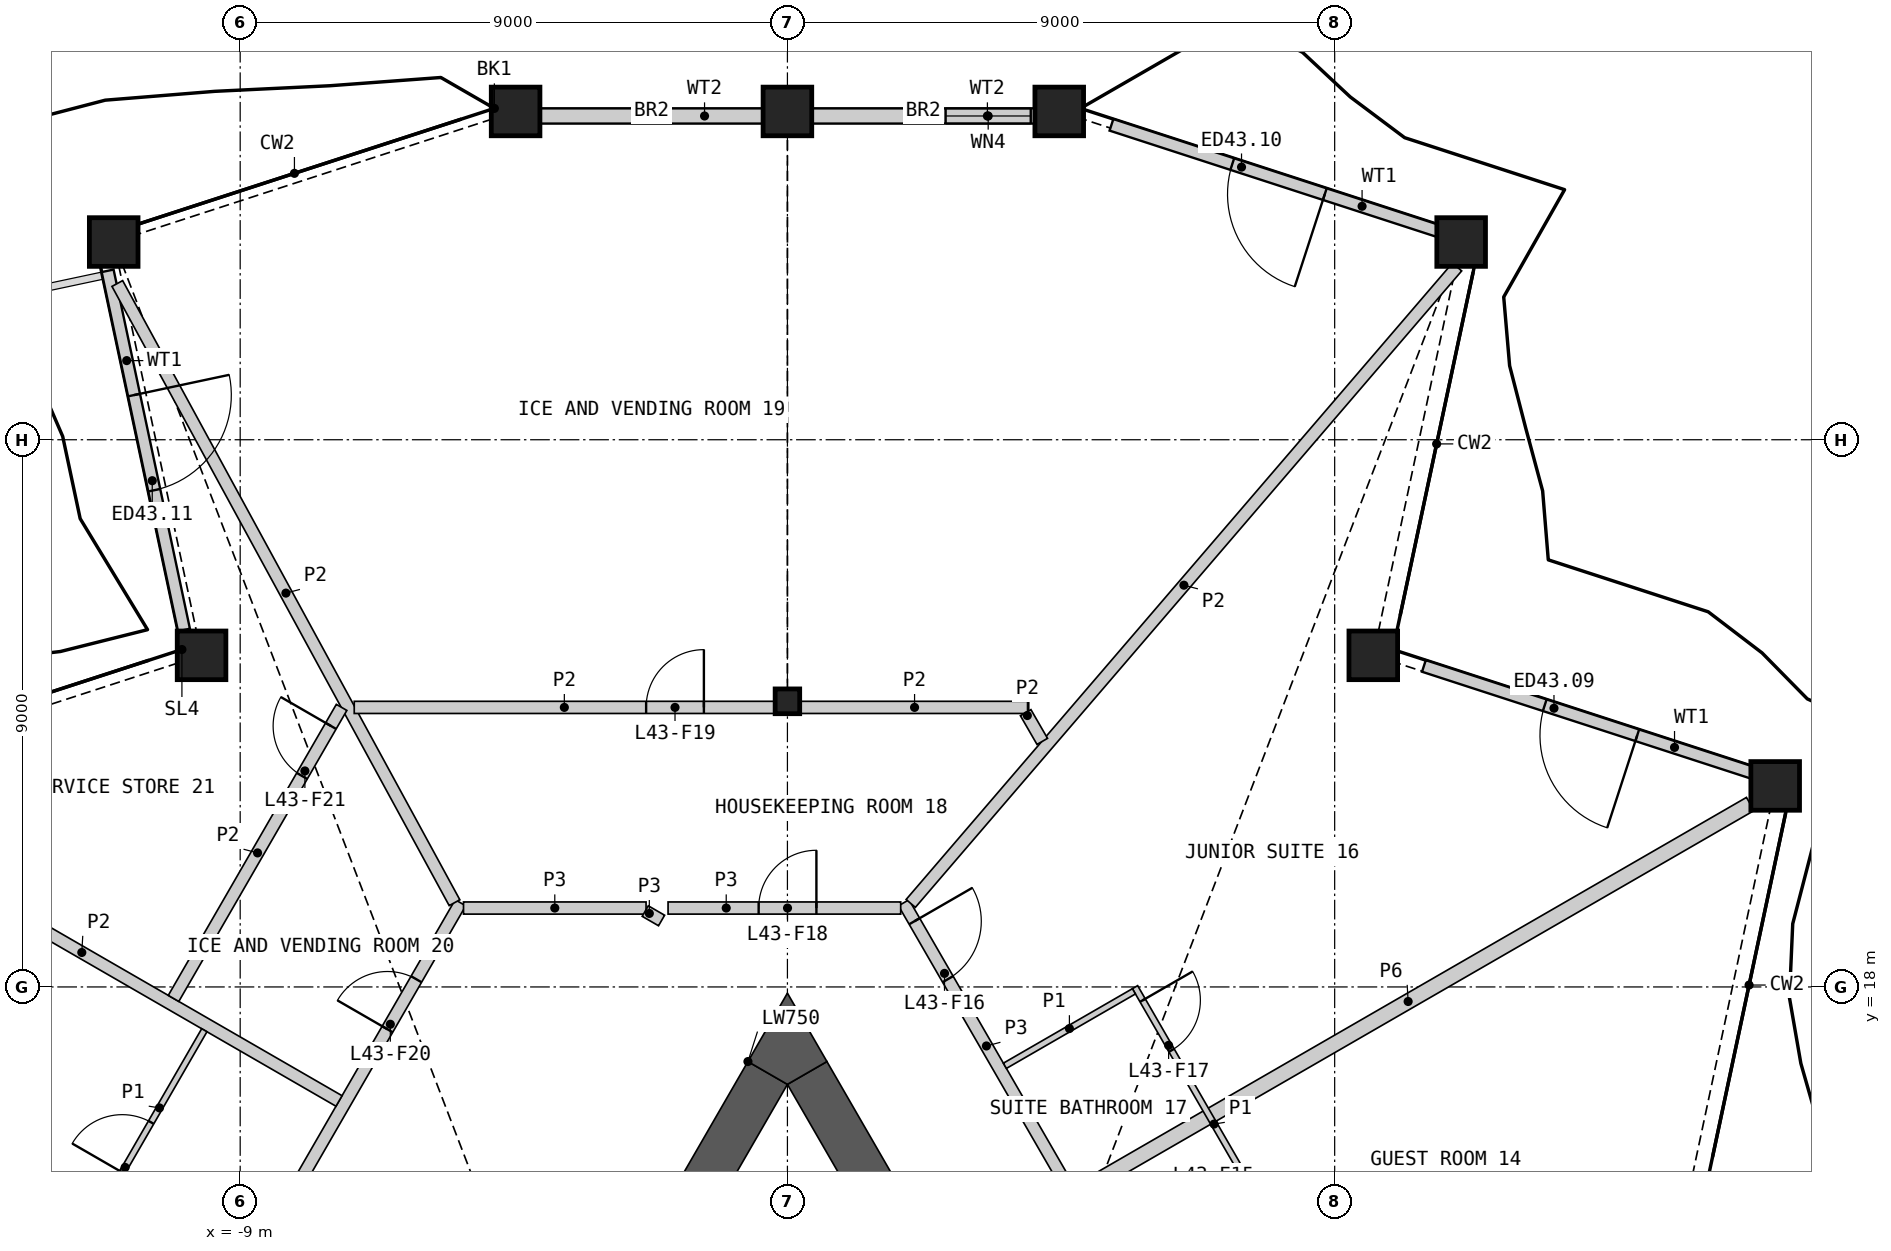
"""IFC4 building model, lengths in metres.
Left out: names, types, materials, properties, quantities, classifications, styles, units other than length and angle.
Written with IfcOpenShell. Run it as: python <this file> out.ifc"""

import sys

from ifc_helpers import new_model, si_unit, direction, frame, frame_2d, origin, origin_2d, place, context, subcontext, project, spatial, polyline, rectangle, hollow_rectangle, i_section, outline, extrude, element, fill, save


model = new_model("IFC4")
c1 = context("Model", 3, precision=1e-05, world=origin(), true_north=direction((0.0, 1.0)))
c2 = subcontext(c1, "Body", "Model", "MODEL_VIEW")
j1 = project(units=[si_unit("LENGTHUNIT", "METRE"), si_unit("PLANEANGLEUNIT", "RADIAN")], contexts=[c1])
p1 = place(None, origin())
s1 = spatial("IfcSite", under=j1, at=p1, CompositionType="ELEMENT")
p2 = place(p1, origin())
s2 = spatial("IfcBuilding", under=s1, at=p2, CompositionType="ELEMENT")
p3 = place(p2, frame((0.0, 0.0, 198.0)))
s3 = spatial("IfcBuildingStorey", under=s2, at=p3, CompositionType="ELEMENT", Elevation=198.0)
for number, where, z_axis, x_axis in (
    (1, (16.245, 21.306, 0.0), (0.0, 0.0, 1.0), (1.0, 0.0, 0.0)),
    (2, (9.635, 23.454, 0.0), (0.0, 0.0, 1.0), (1.0, 0.0, 0.0)),
    (3, (11.08, 30.252, 0.0), (0.0, 0.0, 1.0), (1.0, 0.0, 0.0)),
    (4, (4.47, 32.399, 0.0), (0.0, 0.0, 1.0), (1.0, 0.0, 0.0)),
    (5, (0.0, 32.399, 0.0), (0.0, 0.0, 1.0), (1.0, 0.0, 0.0)),
    (6, (-4.47, 32.399, 0.0), (0.0, 0.0, 1.0), (1.0, 0.0, 0.0)),
    (7, (-11.08, 30.252, 0.0), (0.0, 0.0, 1.0), (1.0, 0.0, 0.0)),
    (8, (-9.635, 23.454, 0.0), (0.0, 0.0, 1.0), (1.0, 0.0, 0.0)),
):
    element("IfcColumn", number, at=place(p3, frame(where, z_axis=z_axis, x_axis=x_axis)), inside=s3, PredefinedType="COLUMN", context=c2, shape_type="SweptSolid", body=[
        extrude(hollow_rectangle(XDim=0.8, YDim=0.8, WallThickness=0.05, at=origin_2d()), origin(), (0.0, 0.0, 1.0), 3.6),
    ])
p4 = place(p3, frame((0.0, 22.698, 0.0), z_axis=(0.0, 0.0, 1.0), x_axis=(1.0, 0.0, 0.0)))
e9 = element("IfcColumn", 9, at=p4, inside=s3, PredefinedType="COLUMN", context=c2, shape_type="SweptSolid", body=[
    extrude(i_section(OverallWidth=0.404, OverallDepth=0.407, WebThickness=0.027, FlangeThickness=0.044, at=origin_2d()), origin(), (0.0, 0.0, 1.0), 3.6),
])
p5 = place(p3, frame((15.963, 21.493, 0.0), z_axis=(0.0, 0.0, 1.0), x_axis=(-0.951059834965, 0.309006780371, 0.0)))
e10 = element("IfcWall", 10, at=p5, inside=s3, PredefinedType="SOLIDWALL", context=c2, shape_type="SweptSolid", body=[
    extrude(rectangle(XDim=5.779, YDim=0.2, at=frame_2d((2.889, 0.0))), origin(), (0.0, 0.0, 1.0), 2.701),
])
p6 = place(p5, frame((2.089, 0.0, 0.0)))
e11 = element("IfcOpeningElement", 11, at=p6, cuts=e10, PredefinedType="OPENING", context=c2, shape_type="SweptSolid", body=[
    extrude(rectangle(XDim=1.6, YDim=2.4, at=frame_2d((0.8, 1.2))), frame((0.0, 0.11, 0.0), z_axis=(0.0, -1.0, 0.0), x_axis=(1.0, 0.0, 0.0)), (0.0, 0.0, 1.0), 0.22),
])
p7 = place(p3, frame((10.825, 30.394, 0.0), z_axis=(0.0, 0.0, 1.0), x_axis=(-0.9510558006, 0.30901919705, 0.0)))
e12 = element("IfcWall", 12, at=p7, inside=s3, PredefinedType="SOLIDWALL", context=c2, shape_type="SweptSolid", body=[
    extrude(rectangle(XDim=5.778, YDim=0.2, at=frame_2d((2.889, 0.0))), origin(), (0.0, 0.0, 1.0), 2.701),
])
p8 = place(p7, frame((2.089, 0.0, 0.0)))
e13 = element("IfcOpeningElement", 13, at=p8, cuts=e12, PredefinedType="OPENING", context=c2, shape_type="SweptSolid", body=[
    extrude(rectangle(XDim=1.6, YDim=2.4, at=frame_2d((0.8, 1.2))), frame((0.0, 0.11, 0.0), z_axis=(0.0, -1.0, 0.0), x_axis=(1.0, 0.0, 0.0)), (0.0, 0.0, 1.0), 0.22),
])
p9 = place(p3, frame((4.252, 32.325, 0.0), z_axis=(0.0, 0.0, 1.0), x_axis=(-1.0, 0.0, 0.0)))
e14 = element("IfcWall", 14, at=p9, inside=s3, PredefinedType="SOLIDWALL", context=c2, shape_type="SweptSolid", body=[
    extrude(rectangle(XDim=3.852, YDim=0.25, at=frame_2d((1.926, 0.0))), origin(), (0.0, 0.0, 1.0), 2.701),
])
p10 = place(p9, frame((0.25, 0.0, 0.4)))
e15 = element("IfcOpeningElement", 15, at=p10, cuts=e14, PredefinedType="OPENING", context=c2, shape_type="SweptSolid", body=[
    extrude(rectangle(XDim=1.4, YDim=0.7, at=frame_2d((0.7, 0.35))), frame((0.0, 0.135, 0.0), z_axis=(0.0, -1.0, 0.0), x_axis=(1.0, 0.0, 0.0)), (0.0, 0.0, 1.0), 0.27),
])
p11 = place(p3, frame((-0.4, 32.325, 0.0), z_axis=(0.0, 0.0, 1.0), x_axis=(-1.0, 0.0, 0.0)))
e16 = element("IfcWall", 16, at=p11, inside=s3, PredefinedType="SOLIDWALL", context=c2, shape_type="SweptSolid", body=[
    extrude(rectangle(XDim=3.852, YDim=0.25, at=frame_2d((1.926, 0.0))), origin(), (0.0, 0.0, 1.0), 2.701),
])
p12 = place(p3, frame((-11.18, 29.778, 0.0), z_axis=(0.0, 0.0, 1.0), x_axis=(0.207894531291, -0.978151247946, 0.0)))
e17 = element("IfcWall", 17, at=p12, inside=s3, PredefinedType="SOLIDWALL", context=c2, shape_type="SweptSolid", body=[
    extrude(rectangle(XDim=6.04, YDim=0.2, at=frame_2d((3.02, 0.0))), origin(), (0.0, 0.0, 1.0), 2.701),
])
p13 = place(p12, frame((2.089, 0.0, 0.0)))
e18 = element("IfcOpeningElement", 18, at=p13, cuts=e17, PredefinedType="OPENING", context=c2, shape_type="SweptSolid", body=[
    extrude(rectangle(XDim=1.6, YDim=2.4, at=frame_2d((0.8, 1.2))), frame((0.0, 0.11, 0.0), z_axis=(0.0, -1.0, 0.0), x_axis=(1.0, 0.0, 0.0)), (0.0, 0.0, 1.0), 0.22),
])
p14 = place(p3, frame((6.875, 5.24, 0.0), z_axis=(0.0, 0.0, 1.0), x_axis=(-0.499997217876, 0.866027010039, 0.0)))
e19 = element("IfcWall", 19, at=p14, inside=s3, PredefinedType="SHEAR", context=c2, shape_type="SweptSolid", body=[
    extrude(rectangle(XDim=13.101, YDim=0.75, at=frame_2d((6.551, 0.0))), origin(), (0.0, 0.0, 1.0), 3.25),
])
p15 = place(p3, frame((-0.325, 16.585, 0.0), z_axis=(0.0, 0.0, 1.0), x_axis=(-0.500012199891, -0.86601836006, 0.0)))
e20 = element("IfcWall", 20, at=p15, inside=s3, PredefinedType="SHEAR", context=c2, shape_type="SweptSolid", body=[
    extrude(rectangle(XDim=7.051, YDim=0.75, at=frame_2d((3.525, 0.0))), origin(), (0.0, 0.0, 1.0), 3.25),
])
p16 = place(p3, origin())
e21 = element("IfcWall", 21, at=p16, inside=s3, PredefinedType="SHEAR", context=c2, shape_type="SweptSolid", body=[
    extrude(outline(polyline([(-0.649, 16.773), (0.0, 17.898), (0.649, 16.773), (0.0, 16.398), (-0.649, 16.773)])), origin(), (0.0, 0.0, 1.0), 3.25),
])
p17 = place(p3, frame((-19.476, -5.035, 0.0), z_axis=(0.0, 0.0, 1.0), x_axis=(0.500000757641, 0.86602496636, 0.0)))
e22 = element("IfcWall", 22, at=p17, inside=s3, PredefinedType="PARTITIONING", context=c2, shape_type="SweptSolid", body=[
    extrude(rectangle(XDim=28.198, YDim=0.2, at=frame_2d((14.099, 0.0))), origin(), (0.0, 0.0, 1.0), 3.25),
])
p18 = place(p17, frame((25.796, 0.0, 0.0)))
e23 = element("IfcOpeningElement", 23, at=p18, cuts=e22, PredefinedType="OPENING", context=c2, shape_type="SweptSolid", body=[
    extrude(rectangle(XDim=0.95, YDim=2.1, at=frame_2d((0.475, 1.05))), frame((0.0, 0.11, 0.0), z_axis=(0.0, -1.0, 0.0), x_axis=(1.0, 0.0, 0.0)), (0.0, 0.0, 1.0), 0.22),
])
p19 = place(p17, frame((14.603, 0.0, 0.0)))
e24 = element("IfcOpeningElement", 24, at=p19, cuts=e22, PredefinedType="OPENING", context=c2, shape_type="SweptSolid", body=[
    extrude(rectangle(XDim=1.1, YDim=2.1, at=frame_2d((0.55, 1.05))), frame((0.0, 0.11, 0.0), z_axis=(0.0, -1.0, 0.0), x_axis=(1.0, 0.0, 0.0)), (0.0, 0.0, 1.0), 0.22),
])
p20 = place(p17, frame((11.993, 0.0, 0.0)))
e25 = element("IfcOpeningElement", 25, at=p20, cuts=e22, PredefinedType="OPENING", context=c2, shape_type="SweptSolid", body=[
    extrude(rectangle(XDim=1.1, YDim=2.1, at=frame_2d((0.55, 1.05))), frame((0.0, 0.11, 0.0), z_axis=(0.0, -1.0, 0.0), x_axis=(1.0, 0.0, 0.0)), (0.0, 0.0, 1.0), 0.22),
])
p21 = place(p17, frame((1.452, 0.0, 0.0)))
e26 = element("IfcOpeningElement", 26, at=p21, cuts=e22, PredefinedType="OPENING", context=c2, shape_type="SweptSolid", body=[
    extrude(rectangle(XDim=0.95, YDim=2.1, at=frame_2d((0.475, 1.05))), frame((0.0, 0.11, 0.0), z_axis=(0.0, -1.0, 0.0), x_axis=(1.0, 0.0, 0.0)), (0.0, 0.0, 1.0), 0.22),
])
p22 = place(p3, frame((4.582, 14.512, 0.0), z_axis=(0.0, 0.0, 1.0), x_axis=(0.866027263711, 0.4999967785, 0.0)))
e27 = element("IfcWall", 27, at=p22, inside=s3, PredefinedType="PARTITIONING", context=c2, shape_type="SweptSolid", body=[
    extrude(rectangle(XDim=12.994, YDim=0.25, at=frame_2d((6.497, 0.0))), origin(), (0.0, 0.0, 1.0), 2.404),
])
p23 = place(p3, frame((1.913, 19.385, 0.0), z_axis=(0.0, 0.0, 1.0), x_axis=(0.499972435384, -0.866041317638, 0.0)))
e28 = element("IfcWall", 28, at=p23, inside=s3, PredefinedType="PARTITIONING", context=c2, shape_type="SweptSolid", body=[
    extrude(rectangle(XDim=5.439, YDim=0.2, at=frame_2d((2.719, 0.0))), origin(), (0.0, 0.0, 1.0), 3.25),
])
p24 = place(p23, frame((0.351, 0.0, 0.0)))
e29 = element("IfcOpeningElement", 29, at=p24, cuts=e28, PredefinedType="OPENING", context=c2, shape_type="SweptSolid", body=[
    extrude(rectangle(XDim=1.1, YDim=2.1, at=frame_2d((0.55, 1.05))), frame((0.0, 0.11, 0.0), z_axis=(0.0, -1.0, 0.0), x_axis=(1.0, 0.0, 0.0)), (0.0, 0.0, 1.0), 0.22),
])
p25 = place(p3, frame((-1.963, 19.298, 0.0), z_axis=(0.0, 0.0, 1.0), x_axis=(1.0, 0.0, 0.0)))
e30 = element("IfcWall", 30, at=p25, inside=s3, PredefinedType="PARTITIONING", context=c2, shape_type="SweptSolid", body=[
    extrude(rectangle(XDim=3.826, YDim=0.2, at=frame_2d((1.913, 0.0))), origin(), (0.0, 0.0, 1.0), 3.25),
])
p26 = place(p25, frame((1.49, 0.0, 0.0)))
e31 = element("IfcOpeningElement", 31, at=p26, cuts=e30, PredefinedType="OPENING", context=c2, shape_type="SweptSolid", body=[
    extrude(rectangle(XDim=0.95, YDim=2.1, at=frame_2d((0.475, 1.05))), frame((0.0, 0.11, 0.0), z_axis=(0.0, -1.0, 0.0), x_axis=(1.0, 0.0, 0.0)), (0.0, 0.0, 1.0), 0.22),
])
p27 = place(p3, frame((-5.327, 19.298, 0.0), z_axis=(0.0, 0.0, 1.0), x_axis=(1.0, 0.0, 0.0)))
e32 = element("IfcWall", 32, at=p27, inside=s3, PredefinedType="PARTITIONING", context=c2, shape_type="SweptSolid", body=[
    extrude(rectangle(XDim=3.002, YDim=0.2, at=frame_2d((1.501, 0.0))), origin(), (0.0, 0.0, 1.0), 3.25),
])
p28 = place(p3, frame((-2.338, 19.248, 0.0), z_axis=(0.0, 0.0, 1.0), x_axis=(0.866395311824, -0.499358752451, 0.0)))
e33 = element("IfcWall", 33, at=p28, inside=s3, PredefinedType="PARTITIONING", context=c2, shape_type="SweptSolid", body=[
    extrude(rectangle(XDim=0.31, YDim=0.2, at=frame_2d((0.155, 0.0))), origin(), (0.0, 0.0, 1.0), 3.25),
])
p29 = place(p3, frame((2.028, 19.374, 0.0), z_axis=(0.0, 0.0, 1.0), x_axis=(0.651304244859, 0.758816697647, 0.0)))
e34 = element("IfcWall", 34, at=p29, inside=s3, PredefinedType="PARTITIONING", context=c2, shape_type="SweptSolid", body=[
    extrude(rectangle(XDim=13.795, YDim=0.2, at=frame_2d((6.897, 0.0))), origin(), (0.0, 0.0, 1.0), 2.404),
])
p30 = place(p3, frame((-11.021, 29.57, 0.0), z_axis=(0.0, 0.0, 1.0), x_axis=(0.478233946204, -0.878232482147, 0.0)))
e35 = element("IfcWall", 35, at=p30, inside=s3, PredefinedType="PARTITIONING", context=c2, shape_type="SweptSolid", body=[
    extrude(rectangle(XDim=11.596, YDim=0.2, at=frame_2d((5.798, 0.0))), origin(), (0.0, 0.0, 1.0), 2.404),
])
p31 = place(p3, frame((-15.835, 21.009, 0.0), z_axis=(0.0, 0.0, 1.0), x_axis=(0.866024525919, -0.500001520505, 0.0)))
e36 = element("IfcWall", 36, at=p31, inside=s3, PredefinedType="PARTITIONING", context=c2, shape_type="SweptSolid", body=[
    extrude(rectangle(XDim=9.769, YDim=0.2, at=frame_2d((4.885, 0.0))), origin(), (0.0, 0.0, 1.0), 2.404),
])
p32 = place(p3, frame((-7.124, 22.598, 0.0), z_axis=(0.0, 0.0, 1.0), x_axis=(1.0, 0.0, 0.0)))
e37 = element("IfcWall", 37, at=p32, inside=s3, PredefinedType="PARTITIONING", context=c2, shape_type="SweptSolid", body=[
    extrude(rectangle(XDim=6.911, YDim=0.2, at=frame_2d((3.455, 0.0))), origin(), (0.0, 0.0, 1.0), 2.404),
])
p33 = place(p32, frame((4.801, 0.0, 0.0)))
e38 = element("IfcOpeningElement", 38, at=p33, cuts=e37, PredefinedType="OPENING", context=c2, shape_type="SweptSolid", body=[
    extrude(rectangle(XDim=0.95, YDim=2.1, at=frame_2d((0.475, 1.05))), frame((0.0, 0.11, 0.0), z_axis=(0.0, -1.0, 0.0), x_axis=(1.0, 0.0, 0.0)), (0.0, 0.0, 1.0), 0.22),
])
p34 = place(p3, frame((-10.096, 17.811, 0.0), z_axis=(0.0, 0.0, 1.0), x_axis=(0.500015590807, 0.866016402241, 0.0)))
e39 = element("IfcWall", 39, at=p34, inside=s3, PredefinedType="PARTITIONING", context=c2, shape_type="SweptSolid", body=[
    extrude(rectangle(XDim=5.527, YDim=0.2, at=frame_2d((2.764, 0.0))), origin(), (0.0, 0.0, 1.0), 2.404),
])
p35 = place(p34, frame((4.225, 0.0, 0.0)))
e40 = element("IfcOpeningElement", 40, at=p35, cuts=e39, PredefinedType="OPENING", context=c2, shape_type="SweptSolid", body=[
    extrude(rectangle(XDim=0.95, YDim=2.1, at=frame_2d((0.475, 1.05))), frame((0.0, 0.11, 0.0), z_axis=(0.0, -1.0, 0.0), x_axis=(1.0, 0.0, 0.0)), (0.0, 0.0, 1.0), 0.22),
])
p36 = place(p3, frame((0.214, 22.598, 0.0), z_axis=(0.0, 0.0, 1.0), x_axis=(1.0, 0.0, 0.0)))
e41 = element("IfcWall", 41, at=p36, inside=s3, PredefinedType="PARTITIONING", context=c2, shape_type="SweptSolid", body=[
    extrude(rectangle(XDim=3.755, YDim=0.2, at=frame_2d((1.877, 0.0))), origin(), (0.0, 0.0, 1.0), 2.404),
])
p37 = place(p3, frame((3.918, 22.511, 0.0), z_axis=(0.0, 0.0, 1.0), x_axis=(0.500083826171, -0.865977001312, 0.0)))
e42 = element("IfcWall", 42, at=p37, inside=s3, PredefinedType="PARTITIONING", context=c2, shape_type="SweptSolid", body=[
    extrude(rectangle(XDim=0.546, YDim=0.2, at=frame_2d((0.273, 0.0))), origin(), (0.0, 0.0, 1.0), 2.404),
])
p38 = place(p3, frame((5.717, 17.996, 0.0), z_axis=(0.0, 0.0, 1.0), x_axis=(0.500027264788, -0.866009661879, 0.0)))
e43 = element("IfcWall", 43, at=p38, inside=s3, PredefinedType="PARTITIONING", context=c2, shape_type="SweptSolid", body=[
    extrude(rectangle(XDim=5.2, YDim=0.1, at=frame_2d((2.6, 0.0))), origin(), (0.0, 0.0, 1.0), 2.404),
])
p39 = place(p38, frame((4.0, 0.0, 0.0)))
e44 = element("IfcOpeningElement", 44, at=p39, cuts=e43, PredefinedType="OPENING", context=c2, shape_type="SweptSolid", body=[
    extrude(rectangle(XDim=0.95, YDim=2.1, at=frame_2d((0.475, 1.05))), frame((0.0, 0.06, 0.0), z_axis=(0.0, -1.0, 0.0), x_axis=(1.0, 0.0, 0.0)), (0.0, 0.0, 1.0), 0.12),
])
p40 = place(p38, frame((0.25, 0.0, 0.0)))
e45 = element("IfcOpeningElement", 45, at=p40, cuts=e43, PredefinedType="OPENING", context=c2, shape_type="SweptSolid", body=[
    extrude(rectangle(XDim=0.95, YDim=2.1, at=frame_2d((0.475, 1.05))), frame((0.0, 0.06, 0.0), z_axis=(0.0, -1.0, 0.0), x_axis=(1.0, 0.0, 0.0)), (0.0, 0.0, 1.0), 0.12),
])
p41 = place(p3, frame((-11.065, 14.733, 0.0), z_axis=(0.0, 0.0, 1.0), x_axis=(0.500037662692, 0.866003658127, 0.0)))
e46 = element("IfcWall", 46, at=p41, inside=s3, PredefinedType="PARTITIONING", context=c2, shape_type="SweptSolid", body=[
    extrude(rectangle(XDim=2.95, YDim=0.1, at=frame_2d((1.475, 0.0))), origin(), (0.0, 0.0, 1.0), 2.404),
])
p42 = place(p41, frame((0.25, 0.0, 0.0)))
e47 = element("IfcOpeningElement", 47, at=p42, cuts=e46, PredefinedType="OPENING", context=c2, shape_type="SweptSolid", body=[
    extrude(rectangle(XDim=0.95, YDim=2.1, at=frame_2d((0.475, 1.05))), frame((0.0, 0.06, 0.0), z_axis=(0.0, -1.0, 0.0), x_axis=(1.0, 0.0, 0.0)), (0.0, 0.0, 1.0), 0.12),
])
p43 = place(p3, frame((3.576, 16.703, 0.0), z_axis=(0.0, 0.0, 1.0), x_axis=(0.866057815567, 0.499943856944, 0.0)))
e48 = element("IfcWall", 48, at=p43, inside=s3, PredefinedType="PARTITIONING", context=c2, shape_type="SweptSolid", body=[
    extrude(rectangle(XDim=2.45, YDim=0.1, at=frame_2d((1.225, 0.0))), origin(), (0.0, 0.0, 1.0), 2.404),
])
p44 = place(p6, origin())
e49 = element("IfcDoor", 49, at=p44, inside=s3, OperationType="DOUBLE_DOOR_SINGLE_SWING", PredefinedType="DOOR", context=c2, shape_type="SweptSolid", body=[
    extrude(rectangle(XDim=1.6, YDim=2.4, at=frame_2d((0.8, 1.2))), frame((0.0, 0.025, 0.0), z_axis=(0.0, -1.0, 0.0), x_axis=(1.0, 0.0, 0.0)), (0.0, 0.0, 1.0), 0.05),
])
fill(e11, e49)
p45 = place(p8, origin())
e50 = element("IfcDoor", 50, at=p45, inside=s3, OperationType="DOUBLE_DOOR_SINGLE_SWING", PredefinedType="DOOR", context=c2, shape_type="SweptSolid", body=[
    extrude(rectangle(XDim=1.6, YDim=2.4, at=frame_2d((0.8, 1.2))), frame((0.0, 0.025, 0.0), z_axis=(0.0, -1.0, 0.0), x_axis=(1.0, 0.0, 0.0)), (0.0, 0.0, 1.0), 0.05),
])
fill(e13, e50)
p46 = place(p10, origin())
e51 = element("IfcWindow", 51, at=p46, inside=s3, PartitioningType="SINGLE_PANEL", PredefinedType="WINDOW", context=c2, shape_type="SweptSolid", body=[
    extrude(rectangle(XDim=1.4, YDim=0.7, at=frame_2d((0.7, 0.35))), frame((0.0, 0.03, 0.0), z_axis=(0.0, -1.0, 0.0), x_axis=(1.0, 0.0, 0.0)), (0.0, 0.0, 1.0), 0.06),
])
fill(e15, e51)
p47 = place(p13, origin())
e52 = element("IfcDoor", 52, at=p47, inside=s3, OperationType="DOUBLE_DOOR_SINGLE_SWING", PredefinedType="DOOR", context=c2, shape_type="SweptSolid", body=[
    extrude(rectangle(XDim=1.6, YDim=2.4, at=frame_2d((0.8, 1.2))), frame((0.0, 0.025, 0.0), z_axis=(0.0, -1.0, 0.0), x_axis=(1.0, 0.0, 0.0)), (0.0, 0.0, 1.0), 0.05),
])
fill(e18, e52)
p48 = place(p24, origin())
e53 = element("IfcDoor", 53, at=p48, inside=s3, OperationType="SINGLE_SWING_LEFT", PredefinedType="DOOR", context=c2, shape_type="SweptSolid", body=[
    extrude(rectangle(XDim=1.1, YDim=2.1, at=frame_2d((0.55, 1.05))), frame((0.0, 0.025, 0.0), z_axis=(0.0, -1.0, 0.0), x_axis=(1.0, 0.0, 0.0)), (0.0, 0.0, 1.0), 0.05),
])
fill(e29, e53)
p49 = place(p40, origin())
e54 = element("IfcDoor", 54, at=p49, inside=s3, OperationType="SINGLE_SWING_LEFT", PredefinedType="DOOR", context=c2, shape_type="SweptSolid", body=[
    extrude(rectangle(XDim=0.95, YDim=2.1, at=frame_2d((0.475, 1.05))), frame((0.0, 0.025, 0.0), z_axis=(0.0, -1.0, 0.0), x_axis=(1.0, 0.0, 0.0)), (0.0, 0.0, 1.0), 0.05),
])
fill(e45, e54)
p50 = place(p26, origin())
e55 = element("IfcDoor", 55, at=p50, inside=s3, OperationType="SINGLE_SWING_RIGHT", PredefinedType="DOOR", context=c2, shape_type="SweptSolid", body=[
    extrude(rectangle(XDim=0.95, YDim=2.1, at=frame_2d((0.475, 1.05))), frame((0.0, 0.025, 0.0), z_axis=(0.0, -1.0, 0.0), x_axis=(1.0, 0.0, 0.0)), (0.0, 0.0, 1.0), 0.05),
])
fill(e31, e55)
p51 = place(p33, origin())
e56 = element("IfcDoor", 56, at=p51, inside=s3, OperationType="SINGLE_SWING_RIGHT", PredefinedType="DOOR", context=c2, shape_type="SweptSolid", body=[
    extrude(rectangle(XDim=0.95, YDim=2.1, at=frame_2d((0.475, 1.05))), frame((0.0, 0.025, 0.0), z_axis=(0.0, -1.0, 0.0), x_axis=(1.0, 0.0, 0.0)), (0.0, 0.0, 1.0), 0.05),
])
fill(e38, e56)
p52 = place(p18, origin())
e57 = element("IfcDoor", 57, at=p52, inside=s3, OperationType="SINGLE_SWING_LEFT", PredefinedType="DOOR", context=c2, shape_type="SweptSolid", body=[
    extrude(rectangle(XDim=0.95, YDim=2.1, at=frame_2d((0.475, 1.05))), frame((0.0, 0.025, 0.0), z_axis=(0.0, -1.0, 0.0), x_axis=(1.0, 0.0, 0.0)), (0.0, 0.0, 1.0), 0.05),
])
fill(e23, e57)
p53 = place(p35, origin())
e58 = element("IfcDoor", 58, at=p53, inside=s3, OperationType="SINGLE_SWING_RIGHT", PredefinedType="DOOR", context=c2, shape_type="SweptSolid", body=[
    extrude(rectangle(XDim=0.95, YDim=2.1, at=frame_2d((0.475, 1.05))), frame((0.0, 0.025, 0.0), z_axis=(0.0, -1.0, 0.0), x_axis=(1.0, 0.0, 0.0)), (0.0, 0.0, 1.0), 0.05),
])
fill(e40, e58)
p54 = place(p42, origin())
e59 = element("IfcDoor", 59, at=p54, inside=s3, OperationType="SINGLE_SWING_LEFT", PredefinedType="DOOR", context=c2, shape_type="SweptSolid", body=[
    extrude(rectangle(XDim=0.95, YDim=2.1, at=frame_2d((0.475, 1.05))), frame((0.0, 0.025, 0.0), z_axis=(0.0, -1.0, 0.0), x_axis=(1.0, 0.0, 0.0)), (0.0, 0.0, 1.0), 0.05),
])
fill(e47, e59)
save(model, sys.argv[1])
